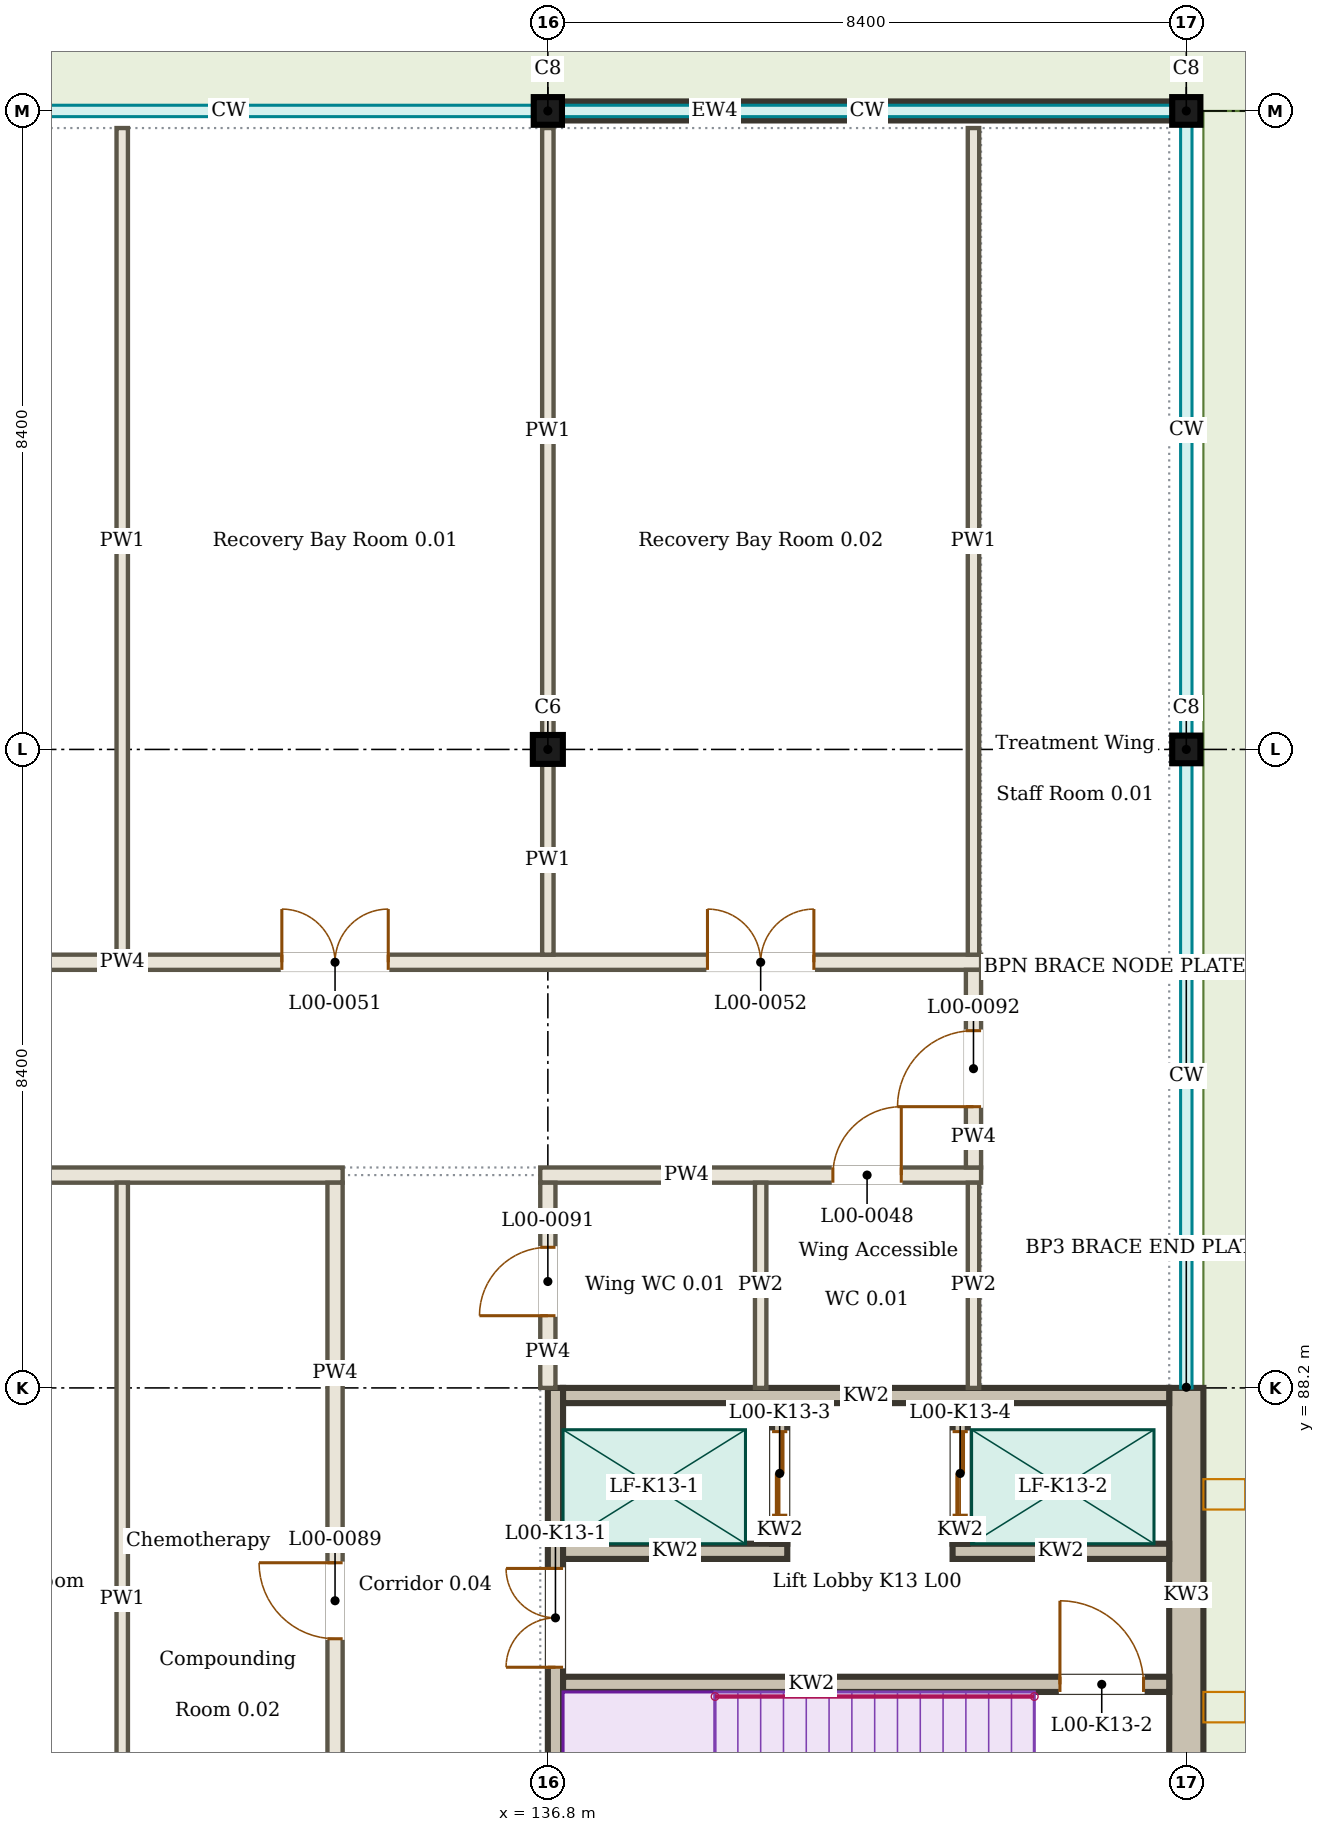
"""IFC4 building model, lengths in metres.
Left out: names, types, materials, properties, quantities, classifications, styles, units other than length and angle.
Written with IfcOpenShell. Run it as: python <this file> out.ifc"""

import sys

from ifc_helpers import new_model, si_unit, direction, frame, frame_2d, origin, origin_2d, place, context, subcontext, project, spatial, rectangle, i_section, extrude, element, fill, save


model = new_model("IFC4")
c1 = context("Model", 3, precision=1e-05, world=origin(), true_north=direction((0.0, 1.0)))
c2 = subcontext(c1, "Body", "Model", "MODEL_VIEW")
j1 = project(units=[si_unit("LENGTHUNIT", "METRE"), si_unit("PLANEANGLEUNIT", "RADIAN")], contexts=[c1])
p1 = place(None, origin())
s1 = spatial("IfcSite", under=j1, at=p1, CompositionType="ELEMENT")
p2 = place(p1, origin())
s2 = spatial("IfcBuilding", under=s1, at=p2, CompositionType="ELEMENT")
p3 = place(p2, origin())
s3 = spatial("IfcBuildingStorey", under=s2, at=p3, CompositionType="ELEMENT", Elevation=0.0)
p4 = place(p3, frame((136.8, 96.6, 0.0), z_axis=(0.0, 0.0, 1.0), x_axis=(1.0, 0.0, 0.0)))
e1 = element("IfcColumn", 1, at=p4, inside=s3, PredefinedType="COLUMN", context=c2, shape_type="SweptSolid", body=[
    extrude(i_section(OverallWidth=0.395, OverallDepth=0.38, WebThickness=0.019, FlangeThickness=0.03, FilletRadius=0.027, at=origin_2d()), origin(), (0.0, 0.0, 1.0), 4.5),
])
for number, where, z_axis, x_axis in (
    (2, (145.2, 96.6, 0.0), (0.0, 0.0, 1.0), (1.0, 0.0, 0.0)),
    (3, (136.8, 105.0, 0.0), (0.0, 0.0, 1.0), (1.0, 0.0, 0.0)),
    (4, (145.2, 105.0, 0.0), (0.0, 0.0, 1.0), (1.0, 0.0, 0.0)),
):
    element("IfcColumn", number, at=place(p3, frame(where, z_axis=z_axis, x_axis=x_axis)), inside=s3, PredefinedType="COLUMN", context=c2, shape_type="SweptSolid", body=[
        extrude(i_section(OverallWidth=0.371, OverallDepth=0.364, WebThickness=0.013, FlangeThickness=0.022, FilletRadius=0.027, at=origin_2d()), origin(), (0.0, 0.0, 1.0), 4.5),
    ])
p5 = place(p3, frame((136.986, 105.0, 0.0), z_axis=(0.0, 0.0, 1.0), x_axis=(1.0, 0.0, 0.0)))
e5 = element("IfcWall", 5, at=p5, inside=s3, PredefinedType="SOLIDWALL", context=c2, shape_type="SweptSolid", body=[
    extrude(rectangle(XDim=8.029, YDim=0.25, at=frame_2d((4.014, 0.0))), origin(), (0.0, 0.0, 1.0), 0.45),
])
p6 = place(p3, frame((136.8, 105.16, 3.87), z_axis=(0.0, 0.0, 1.0), x_axis=(1.0, 0.0, 0.0)))
e6 = element("IfcWall", 6, at=p6, inside=s3, PredefinedType="SOLIDWALL", context=c2, shape_type="SweptSolid", body=[
    extrude(rectangle(XDim=8.4, YDim=0.13, at=frame_2d((4.2, 0.0))), origin(), (0.0, 0.0, 1.0), 0.63),
])
p7 = place(p3, frame((114.3, 91.0, 0.0), z_axis=(0.0, 0.0, 1.0), x_axis=(1.0, 0.0, 0.0)))
e7 = element("IfcWall", 7, at=p7, inside=s3, PredefinedType="PARTITIONING", context=c2, shape_type="SweptSolid", body=[
    extrude(rectangle(XDim=19.8, YDim=0.2, at=frame_2d((9.9, 0.0))), origin(), (0.0, 0.0, 1.0), 3.8),
])
p8 = place(p7, frame((8.0, 0.0, 0.0)))
e8 = element("IfcOpeningElement", 8, at=p8, cuts=e7, PredefinedType="OPENING", context=c2, shape_type="SweptSolid", body=[
    extrude(rectangle(XDim=1.0, YDim=2.1, at=frame_2d((0.5, 1.05))), frame((0.0, 0.11, 0.0), z_axis=(0.0, -1.0, 0.0), x_axis=(1.0, 0.0, 0.0)), (0.0, 0.0, 1.0), 0.22),
])
p9 = place(p7, frame((13.6, 0.0, 0.0)))
e9 = element("IfcOpeningElement", 9, at=p9, cuts=e7, PredefinedType="OPENING", context=c2, shape_type="SweptSolid", body=[
    extrude(rectangle(XDim=1.0, YDim=2.1, at=frame_2d((0.5, 1.05))), frame((0.0, 0.11, 0.0), z_axis=(0.0, -1.0, 0.0), x_axis=(1.0, 0.0, 0.0)), (0.0, 0.0, 1.0), 0.22),
])
p10 = place(p3, frame((136.7, 91.0, 0.0), z_axis=(0.0, 0.0, 1.0), x_axis=(1.0, 0.0, 0.0)))
e10 = element("IfcWall", 10, at=p10, inside=s3, PredefinedType="PARTITIONING", context=c2, shape_type="SweptSolid", body=[
    extrude(rectangle(XDim=5.8, YDim=0.2, at=frame_2d((2.9, 0.0))), origin(), (0.0, 0.0, 1.0), 3.8),
])
p11 = place(p10, frame((3.85, 0.0, 0.0)))
e11 = element("IfcOpeningElement", 11, at=p11, cuts=e10, PredefinedType="OPENING", context=c2, shape_type="SweptSolid", body=[
    extrude(rectangle(XDim=0.9, YDim=2.1, at=frame_2d((0.45, 1.05))), frame((0.0, 0.11, 0.0), z_axis=(0.0, -1.0, 0.0), x_axis=(1.0, 0.0, 0.0)), (0.0, 0.0, 1.0), 0.22),
])
p12 = place(p3, frame((119.9, 93.8, 0.0), z_axis=(0.0, 0.0, 1.0), x_axis=(1.0, 0.0, 0.0)))
e12 = element("IfcWall", 12, at=p12, inside=s3, PredefinedType="PARTITIONING", context=c2, shape_type="SweptSolid", body=[
    extrude(rectangle(XDim=22.6, YDim=0.2, at=frame_2d((11.3, 0.0))), origin(), (0.0, 0.0, 1.0), 3.8),
])
p13 = place(p12, frame((2.2, 0.0, 0.0)))
e13 = element("IfcOpeningElement", 13, at=p13, cuts=e12, PredefinedType="OPENING", context=c2, shape_type="SweptSolid", body=[
    extrude(rectangle(XDim=1.4, YDim=2.1, at=frame_2d((0.7, 1.05))), frame((0.0, 0.11, 0.0), z_axis=(0.0, -1.0, 0.0), x_axis=(1.0, 0.0, 0.0)), (0.0, 0.0, 1.0), 0.22),
])
p14 = place(p12, frame((7.8, 0.0, 0.0)))
e14 = element("IfcOpeningElement", 14, at=p14, cuts=e12, PredefinedType="OPENING", context=c2, shape_type="SweptSolid", body=[
    extrude(rectangle(XDim=1.4, YDim=2.1, at=frame_2d((0.7, 1.05))), frame((0.0, 0.11, 0.0), z_axis=(0.0, -1.0, 0.0), x_axis=(1.0, 0.0, 0.0)), (0.0, 0.0, 1.0), 0.22),
])
p15 = place(p12, frame((13.4, 0.0, 0.0)))
e15 = element("IfcOpeningElement", 15, at=p15, cuts=e12, PredefinedType="OPENING", context=c2, shape_type="SweptSolid", body=[
    extrude(rectangle(XDim=1.4, YDim=2.1, at=frame_2d((0.7, 1.05))), frame((0.0, 0.11, 0.0), z_axis=(0.0, -1.0, 0.0), x_axis=(1.0, 0.0, 0.0)), (0.0, 0.0, 1.0), 0.22),
])
p16 = place(p12, frame((19.0, 0.0, 0.0)))
e16 = element("IfcOpeningElement", 16, at=p16, cuts=e12, PredefinedType="OPENING", context=c2, shape_type="SweptSolid", body=[
    extrude(rectangle(XDim=1.4, YDim=2.1, at=frame_2d((0.7, 1.05))), frame((0.0, 0.11, 0.0), z_axis=(0.0, -1.0, 0.0), x_axis=(1.0, 0.0, 0.0)), (0.0, 0.0, 1.0), 0.22),
])
p17 = place(p3, frame((131.2, 79.95, 0.0), z_axis=(0.0, 0.0, 1.0), x_axis=(0.0, 1.0, 0.0)))
e17 = element("IfcWall", 17, at=p17, inside=s3, PredefinedType="PARTITIONING", context=c2, shape_type="SweptSolid", body=[
    extrude(rectangle(XDim=10.95, YDim=0.15, at=frame_2d((5.475, 0.0))), origin(), (0.0, 0.0, 1.0), 3.8),
])
p18 = place(p3, frame((131.2, 93.9, 0.0), z_axis=(0.0, 0.0, 1.0), x_axis=(0.0, 1.0, 0.0)))
e18 = element("IfcWall", 18, at=p18, inside=s3, PredefinedType="PARTITIONING", context=c2, shape_type="SweptSolid", body=[
    extrude(rectangle(XDim=10.875, YDim=0.15, at=frame_2d((5.438, 0.0))), origin(), (0.0, 0.0, 1.0), 3.8),
])
p19 = place(p3, frame((134.0, 79.95, 0.0), z_axis=(0.0, 0.0, 1.0), x_axis=(0.0, 1.0, 0.0)))
e19 = element("IfcWall", 19, at=p19, inside=s3, PredefinedType="PARTITIONING", context=c2, shape_type="SweptSolid", body=[
    extrude(rectangle(XDim=10.95, YDim=0.2, at=frame_2d((5.475, 0.0))), origin(), (0.0, 0.0, 1.0), 3.8),
])
p20 = place(p19, frame((4.95, 0.0, 0.0)))
e20 = element("IfcOpeningElement", 20, at=p20, cuts=e19, PredefinedType="OPENING", context=c2, shape_type="SweptSolid", body=[
    extrude(rectangle(XDim=1.0, YDim=2.1, at=frame_2d((0.5, 1.05))), frame((0.0, 0.11, 0.0), z_axis=(0.0, -1.0, 0.0), x_axis=(1.0, 0.0, 0.0)), (0.0, 0.0, 1.0), 0.22),
])
p21 = place(p3, frame((136.8, 88.2, 0.0), z_axis=(0.0, 0.0, 1.0), x_axis=(0.0, 1.0, 0.0)))
e21 = element("IfcWall", 21, at=p21, inside=s3, PredefinedType="PARTITIONING", context=c2, shape_type="SweptSolid", body=[
    extrude(rectangle(XDim=2.7, YDim=0.2, at=frame_2d((1.35, 0.0))), origin(), (0.0, 0.0, 1.0), 3.8),
])
p22 = place(p21, frame((0.95, 0.0, 0.0)))
e22 = element("IfcOpeningElement", 22, at=p22, cuts=e21, PredefinedType="OPENING", context=c2, shape_type="SweptSolid", body=[
    extrude(rectangle(XDim=0.9, YDim=2.1, at=frame_2d((0.45, 1.05))), frame((0.0, 0.11, 0.0), z_axis=(0.0, -1.0, 0.0), x_axis=(1.0, 0.0, 0.0)), (0.0, 0.0, 1.0), 0.22),
])
p23 = place(p3, frame((136.8, 93.9, 0.0), z_axis=(0.0, 0.0, 1.0), x_axis=(0.0, 1.0, 0.0)))
e23 = element("IfcWall", 23, at=p23, inside=s3, PredefinedType="PARTITIONING", context=c2, shape_type="SweptSolid", body=[
    extrude(rectangle(XDim=2.503, YDim=0.15, at=frame_2d((1.251, 0.0))), origin(), (0.0, 0.0, 1.0), 3.8),
])
p24 = place(p3, frame((136.8, 96.798, 0.0), z_axis=(0.0, 0.0, 1.0), x_axis=(0.0, 1.0, 0.0)))
e24 = element("IfcWall", 24, at=p24, inside=s3, PredefinedType="PARTITIONING", context=c2, shape_type="SweptSolid", body=[
    extrude(rectangle(XDim=7.977, YDim=0.15, at=frame_2d((3.989, 0.0))), origin(), (0.0, 0.0, 1.0), 3.8),
])
for number, where, z_axis, x_axis in (
    (25, (139.6, 88.2, 0.0), (0.0, 0.0, 1.0), (0.0, 1.0, 0.0)),
    (26, (142.4, 88.2, 0.0), (0.0, 0.0, 1.0), (0.0, 1.0, 0.0)),
):
    element("IfcWall", number, at=place(p3, frame(where, z_axis=z_axis, x_axis=x_axis)), inside=s3, PredefinedType="PARTITIONING", context=c2, shape_type="SweptSolid", body=[
        extrude(rectangle(XDim=2.7, YDim=0.15, at=frame_2d((1.35, 0.0))), origin(), (0.0, 0.0, 1.0), 3.95),
    ])
p25 = place(p3, frame((142.4, 91.1, 0.0), z_axis=(0.0, 0.0, 1.0), x_axis=(0.0, 1.0, 0.0)))
e27 = element("IfcWall", 27, at=p25, inside=s3, PredefinedType="PARTITIONING", context=c2, shape_type="SweptSolid", body=[
    extrude(rectangle(XDim=2.6, YDim=0.2, at=frame_2d((1.3, 0.0))), origin(), (0.0, 0.0, 1.0), 3.95),
])
p26 = place(p25, frame((0.8, 0.0, 0.0)))
e28 = element("IfcOpeningElement", 28, at=p26, cuts=e27, PredefinedType="OPENING", context=c2, shape_type="SweptSolid", body=[
    extrude(rectangle(XDim=1.0, YDim=2.1, at=frame_2d((0.5, 1.05))), frame((0.0, 0.11, 0.0), z_axis=(0.0, -1.0, 0.0), x_axis=(1.0, 0.0, 0.0)), (0.0, 0.0, 1.0), 0.22),
])
p27 = place(p3, frame((142.4, 93.9, 0.0), z_axis=(0.0, 0.0, 1.0), x_axis=(0.0, 1.0, 0.0)))
e29 = element("IfcWall", 29, at=p27, inside=s3, PredefinedType="PARTITIONING", context=c2, shape_type="SweptSolid", body=[
    extrude(rectangle(XDim=10.875, YDim=0.15, at=frame_2d((5.438, 0.0))), origin(), (0.0, 0.0, 1.0), 3.8),
])
p28 = place(p3, frame((136.9, 79.8, 0.0), z_axis=(0.0, 0.0, 1.0), x_axis=(0.0, 1.0, 0.0)))
e30 = element("IfcWall", 30, at=p28, inside=s3, PredefinedType="SOLIDWALL", context=c2, shape_type="SweptSolid", body=[
    extrude(rectangle(XDim=8.4, YDim=0.2, at=frame_2d((4.2, 0.0))), origin(), (0.0, 0.0, 1.0), 4.5),
])
p29 = place(p28, frame((4.725, 0.0, 0.0)))
e31 = element("IfcOpeningElement", 31, at=p29, cuts=e30, PredefinedType="OPENING", context=c2, shape_type="SweptSolid", body=[
    extrude(rectangle(XDim=1.3, YDim=2.1, at=frame_2d((0.65, 1.05))), frame((0.0, 0.11, 0.0), z_axis=(0.0, -1.0, 0.0), x_axis=(1.0, 0.0, 0.0)), (0.0, 0.0, 1.0), 0.22),
])
p30 = place(p3, frame((145.2, 79.8, 0.0), z_axis=(0.0, 0.0, 1.0), x_axis=(0.0, 1.0, 0.0)))
e32 = element("IfcWall", 32, at=p30, inside=s3, PredefinedType="SOLIDWALL", context=c2, shape_type="SweptSolid", body=[
    extrude(rectangle(XDim=8.4, YDim=0.45, at=frame_2d((4.2, 0.0))), origin(), (0.0, 0.0, 1.0), 4.5),
])
p31 = place(p30, frame((1.65, 0.0, 0.0)))
e33 = element("IfcOpeningElement", 33, at=p31, cuts=e32, PredefinedType="OPENING", context=c2, shape_type="SweptSolid", body=[
    extrude(rectangle(XDim=1.3, YDim=2.1, at=frame_2d((0.65, 1.05))), frame((0.0, 0.235, 0.0), z_axis=(0.0, -1.0, 0.0), x_axis=(1.0, 0.0, 0.0)), (0.0, 0.0, 1.0), 0.47),
])
p32 = place(p3, frame((137.0, 88.1, 0.0), z_axis=(0.0, 0.0, 1.0), x_axis=(1.0, 0.0, 0.0)))
e34 = element("IfcWall", 34, at=p32, inside=s3, PredefinedType="SOLIDWALL", context=c2, shape_type="SweptSolid", body=[
    extrude(rectangle(XDim=7.975, YDim=0.2, at=frame_2d((3.988, 0.0))), origin(), (0.0, 0.0, 1.0), 4.5),
])
p33 = place(p3, frame((137.0, 84.3, 0.0), z_axis=(0.0, 0.0, 1.0), x_axis=(1.0, 0.0, 0.0)))
e35 = element("IfcWall", 35, at=p33, inside=s3, PredefinedType="SOLIDWALL", context=c2, shape_type="SweptSolid", body=[
    extrude(rectangle(XDim=7.975, YDim=0.2, at=frame_2d((3.988, 0.0))), origin(), (0.0, 0.0, 1.0), 4.5),
])
p34 = place(p33, frame((6.538, 0.0, 0.0)))
e36 = element("IfcOpeningElement", 36, at=p34, cuts=e35, PredefinedType="OPENING", context=c2, shape_type="SweptSolid", body=[
    extrude(rectangle(XDim=1.1, YDim=2.1, at=frame_2d((0.55, 1.05))), frame((0.0, 0.11, 0.0), z_axis=(0.0, -1.0, 0.0), x_axis=(1.0, 0.0, 0.0)), (0.0, 0.0, 1.0), 0.22),
])
p35 = place(p3, frame((137.0, 86.05, 0.0), z_axis=(0.0, 0.0, 1.0), x_axis=(1.0, 0.0, 0.0)))
e37 = element("IfcWall", 37, at=p35, inside=s3, PredefinedType="SOLIDWALL", context=c2, shape_type="SweptSolid", body=[
    extrude(rectangle(XDim=2.95, YDim=0.2, at=frame_2d((1.475, 0.0))), origin(), (0.0, 0.0, 1.0), 4.5),
])
p36 = place(p3, frame((142.125, 86.05, 0.0), z_axis=(0.0, 0.0, 1.0), x_axis=(1.0, 0.0, 0.0)))
e38 = element("IfcWall", 38, at=p36, inside=s3, PredefinedType="SOLIDWALL", context=c2, shape_type="SweptSolid", body=[
    extrude(rectangle(XDim=2.85, YDim=0.2, at=frame_2d((1.425, 0.0))), origin(), (0.0, 0.0, 1.0), 4.5),
])
p37 = place(p3, frame((139.85, 86.15, 0.0), z_axis=(0.0, 0.0, 1.0), x_axis=(0.0, 1.0, 0.0)))
e39 = element("IfcWall", 39, at=p37, inside=s3, PredefinedType="SOLIDWALL", context=c2, shape_type="SweptSolid", body=[
    extrude(rectangle(XDim=1.85, YDim=0.2, at=frame_2d((0.925, 0.0))), origin(), (0.0, 0.0, 1.0), 4.5),
])
p38 = place(p37, frame((0.375, 0.0, 0.0)))
e40 = element("IfcOpeningElement", 40, at=p38, cuts=e39, PredefinedType="OPENING", context=c2, shape_type="SweptSolid", body=[
    extrude(rectangle(XDim=1.1, YDim=2.1, at=frame_2d((0.55, 1.05))), frame((0.0, 0.11, 0.0), z_axis=(0.0, -1.0, 0.0), x_axis=(1.0, 0.0, 0.0)), (0.0, 0.0, 1.0), 0.22),
])
p39 = place(p3, frame((142.225, 86.15, 0.0), z_axis=(0.0, 0.0, 1.0), x_axis=(0.0, 1.0, 0.0)))
e41 = element("IfcWall", 41, at=p39, inside=s3, PredefinedType="SOLIDWALL", context=c2, shape_type="SweptSolid", body=[
    extrude(rectangle(XDim=1.85, YDim=0.2, at=frame_2d((0.925, 0.0))), origin(), (0.0, 0.0, 1.0), 4.5),
])
p40 = place(p39, frame((0.375, 0.0, 0.0)))
e42 = element("IfcOpeningElement", 42, at=p40, cuts=e41, PredefinedType="OPENING", context=c2, shape_type="SweptSolid", body=[
    extrude(rectangle(XDim=1.1, YDim=2.1, at=frame_2d((0.55, 1.05))), frame((0.0, 0.11, 0.0), z_axis=(0.0, -1.0, 0.0), x_axis=(1.0, 0.0, 0.0)), (0.0, 0.0, 1.0), 0.22),
])
p41 = place(p11, origin())
e43 = element("IfcDoor", 43, at=p41, inside=s3, OperationType="SINGLE_SWING_RIGHT", PredefinedType="DOOR", context=c2, shape_type="SweptSolid", body=[
    extrude(rectangle(XDim=0.9, YDim=2.1, at=frame_2d((0.45, 1.05))), frame((0.0, 0.025, 0.0), z_axis=(0.0, -1.0, 0.0), x_axis=(1.0, 0.0, 0.0)), (0.0, 0.0, 1.0), 0.05),
])
fill(e11, e43)
p42 = place(p15, origin())
e44 = element("IfcDoor", 44, at=p42, inside=s3, OperationType="DOUBLE_DOOR_SINGLE_SWING", PredefinedType="DOOR", context=c2, shape_type="SweptSolid", body=[
    extrude(rectangle(XDim=1.4, YDim=2.1, at=frame_2d((0.7, 1.05))), frame((0.0, 0.025, 0.0), z_axis=(0.0, -1.0, 0.0), x_axis=(1.0, 0.0, 0.0)), (0.0, 0.0, 1.0), 0.05),
])
fill(e15, e44)
p43 = place(p16, origin())
e45 = element("IfcDoor", 45, at=p43, inside=s3, OperationType="DOUBLE_DOOR_SINGLE_SWING", PredefinedType="DOOR", context=c2, shape_type="SweptSolid", body=[
    extrude(rectangle(XDim=1.4, YDim=2.1, at=frame_2d((0.7, 1.05))), frame((0.0, 0.025, 0.0), z_axis=(0.0, -1.0, 0.0), x_axis=(1.0, 0.0, 0.0)), (0.0, 0.0, 1.0), 0.05),
])
fill(e16, e45)
p44 = place(p20, origin())
e46 = element("IfcDoor", 46, at=p44, inside=s3, OperationType="SINGLE_SWING_RIGHT", PredefinedType="DOOR", context=c2, shape_type="SweptSolid", body=[
    extrude(rectangle(XDim=1.0, YDim=2.1, at=frame_2d((0.5, 1.05))), frame((0.0, 0.025, 0.0), z_axis=(0.0, -1.0, 0.0), x_axis=(1.0, 0.0, 0.0)), (0.0, 0.0, 1.0), 0.05),
])
fill(e20, e46)
p45 = place(p22, origin())
e47 = element("IfcDoor", 47, at=p45, inside=s3, OperationType="SINGLE_SWING_LEFT", PredefinedType="DOOR", context=c2, shape_type="SweptSolid", body=[
    extrude(rectangle(XDim=0.9, YDim=2.1, at=frame_2d((0.45, 1.05))), frame((0.0, 0.025, 0.0), z_axis=(0.0, -1.0, 0.0), x_axis=(1.0, 0.0, 0.0)), (0.0, 0.0, 1.0), 0.05),
])
fill(e22, e47)
p46 = place(p26, origin())
e48 = element("IfcDoor", 48, at=p46, inside=s3, OperationType="SINGLE_SWING_LEFT", PredefinedType="DOOR", context=c2, shape_type="SweptSolid", body=[
    extrude(rectangle(XDim=1.0, YDim=2.1, at=frame_2d((0.5, 1.05))), frame((0.0, 0.025, 0.0), z_axis=(0.0, -1.0, 0.0), x_axis=(1.0, 0.0, 0.0)), (0.0, 0.0, 1.0), 0.05),
])
fill(e28, e48)
p47 = place(p29, origin())
e49 = element("IfcDoor", 49, at=p47, inside=s3, OperationType="DOUBLE_DOOR_DOUBLE_SWING", PredefinedType="DOOR", context=c2, shape_type="SweptSolid", body=[
    extrude(rectangle(XDim=1.3, YDim=2.1, at=frame_2d((0.65, 1.05))), frame((0.0, 0.025, 0.0), z_axis=(0.0, -1.0, 0.0), x_axis=(1.0, 0.0, 0.0)), (0.0, 0.0, 1.0), 0.05),
])
fill(e31, e49)
p48 = place(p34, origin())
e50 = element("IfcDoor", 50, at=p48, inside=s3, OperationType="SINGLE_SWING_LEFT", PredefinedType="DOOR", context=c2, shape_type="SweptSolid", body=[
    extrude(rectangle(XDim=1.1, YDim=2.1, at=frame_2d((0.55, 1.05))), frame((0.0, 0.025, 0.0), z_axis=(0.0, -1.0, 0.0), x_axis=(1.0, 0.0, 0.0)), (0.0, 0.0, 1.0), 0.05),
])
fill(e36, e50)
p49 = place(p38, origin())
e51 = element("IfcDoor", 51, at=p49, inside=s3, OperationType="DOUBLE_DOOR_SLIDING", PredefinedType="DOOR", context=c2, shape_type="SweptSolid", body=[
    extrude(rectangle(XDim=1.1, YDim=2.1, at=frame_2d((0.55, 1.05))), frame((0.0, 0.025, 0.0), z_axis=(0.0, -1.0, 0.0), x_axis=(1.0, 0.0, 0.0)), (0.0, 0.0, 1.0), 0.05),
])
fill(e40, e51)
p50 = place(p40, origin())
e52 = element("IfcDoor", 52, at=p50, inside=s3, OperationType="DOUBLE_DOOR_SLIDING", PredefinedType="DOOR", context=c2, shape_type="SweptSolid", body=[
    extrude(rectangle(XDim=1.1, YDim=2.1, at=frame_2d((0.55, 1.05))), frame((0.0, 0.025, 0.0), z_axis=(0.0, -1.0, 0.0), x_axis=(1.0, 0.0, 0.0)), (0.0, 0.0, 1.0), 0.05),
])
fill(e42, e52)
save(model, sys.argv[1])
